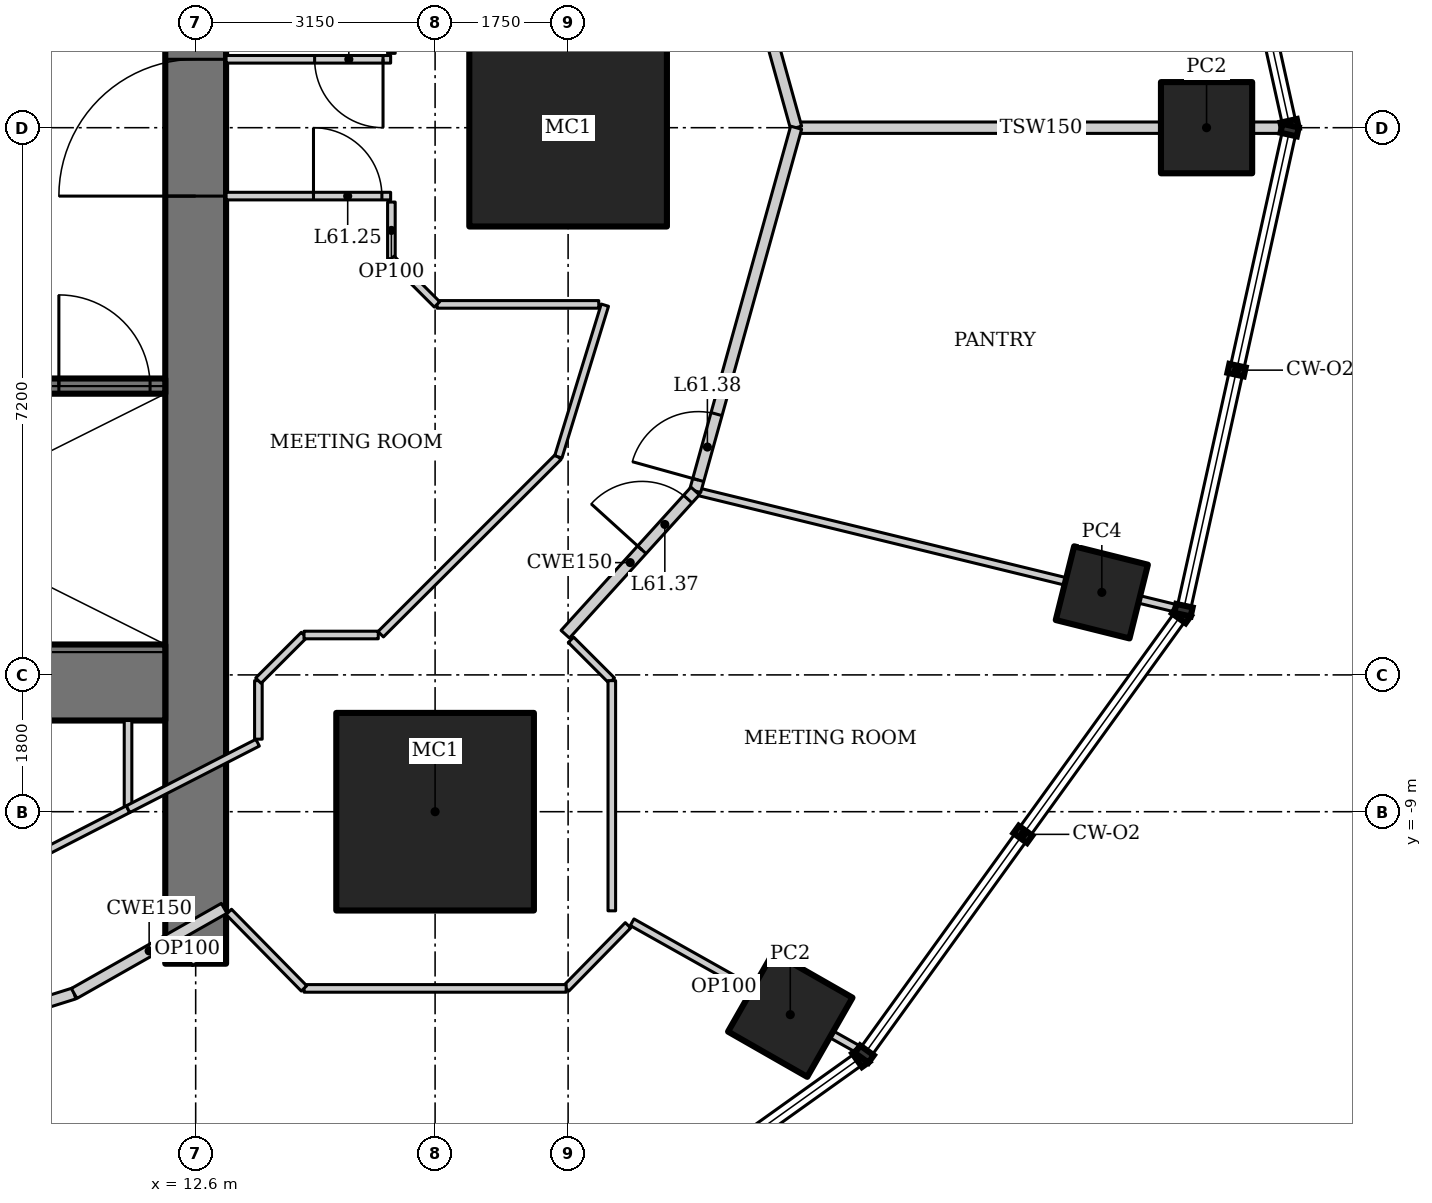
"""IFC4 building model, lengths in metres.
Left out: names, types, materials, properties, quantities, classifications, styles, units other than length and angle.
Written with IfcOpenShell. Run it as: python <this file> out.ifc"""

import sys

from ifc_helpers import new_model, si_unit, direction, frame, frame_2d, origin, origin_2d, place, context, subcontext, project, spatial, rectangle, hollow_rectangle, extrude, element, fill, save


model = new_model("IFC4")
c1 = context("Model", 3, precision=1e-05, world=origin(), true_north=direction((0.0, 1.0)))
c2 = subcontext(c1, "Body", "Model", "MODEL_VIEW")
j1 = project(units=[si_unit("LENGTHUNIT", "METRE"), si_unit("PLANEANGLEUNIT", "RADIAN")], contexts=[c1])
p1 = place(None, origin())
s1 = spatial("IfcSite", under=j1, at=p1, CompositionType="ELEMENT")
p2 = place(p1, origin())
s2 = spatial("IfcBuilding", under=s1, at=p2, CompositionType="ELEMENT")
p3 = place(p2, frame((0.0, 0.0, 262.0)))
s3 = spatial("IfcBuildingStorey", under=s2, at=p3, CompositionType="ELEMENT", Elevation=262.0)
for number, where, z_axis, x_axis in (
    (1, (17.5, 0.0, 0.0), (0.0, 0.0, 1.0), (1.0, 0.0, 0.0)),
    (2, (15.75, -9.0, 0.0), (0.0, 0.0, 1.0), (1.0, 0.0, 0.0)),
):
    element("IfcColumn", number, at=place(p3, frame(where, z_axis=z_axis, x_axis=x_axis)), inside=s3, PredefinedType="COLUMN", context=c2, shape_type="SweptSolid", body=[
        extrude(hollow_rectangle(XDim=2.6, YDim=2.6, WallThickness=0.13, at=origin_2d()), origin(), (0.0, 0.0, 1.0), 4.2),
    ])
for number, where, z_axis, x_axis in (
    (3, (25.9, 0.0, 0.0), (0.0, 0.0, 1.0), (1.0, 0.0, 0.0)),
    (4, (20.423, -11.67, 0.0), (0.0, 0.0, 1.0), (0.496, 0.868, 0.0)),
):
    element("IfcColumn", number, at=place(p3, frame(where, z_axis=z_axis, x_axis=x_axis)), inside=s3, PredefinedType="COLUMN", context=c2, shape_type="SweptSolid", body=[
        extrude(hollow_rectangle(XDim=1.2, YDim=1.2, WallThickness=0.1, at=origin_2d()), origin(), (0.0, 0.0, 1.0), 2.88),
    ])
p4 = place(p3, frame((24.522, -6.114, 0.0), z_axis=(0.0, 0.0, 1.0), x_axis=(0.2419218956, 0.970295726276, 0.0)))
e5 = element("IfcColumn", 5, at=p4, inside=s3, PredefinedType="COLUMN", context=c2, shape_type="SweptSolid", body=[
    extrude(hollow_rectangle(XDim=1.0, YDim=1.0, WallThickness=0.08, at=origin_2d()), origin(), (0.0, 0.0, 1.0), 3.1),
])
p5 = place(p3, frame((12.6, -11.0, 0.0), z_axis=(0.0, 0.0, 1.0), x_axis=(0.0, 1.0, 0.0)))
e6 = element("IfcWall", 6, at=p5, inside=s3, PredefinedType="SHEAR", context=c2, shape_type="SweptSolid", body=[
    extrude(rectangle(XDim=22.0, YDim=0.8, at=frame_2d((11.0, 0.0))), origin(), (0.0, 0.0, 1.0), 4.2),
])
p6 = place(p5, frame((10.1, 0.0, 0.0)))
e7 = element("IfcOpeningElement", 7, at=p6, cuts=e6, PredefinedType="OPENING", context=c2, shape_type="SweptSolid", body=[
    extrude(rectangle(XDim=1.8, YDim=2.1, at=frame_2d((0.9, 1.05))), frame((0.0, 0.41, 0.0), z_axis=(0.0, -1.0, 0.0), x_axis=(1.0, 0.0, 0.0)), (0.0, 0.0, 1.0), 0.82),
])
p7 = place(p3, frame((-12.2, -7.3, 0.0), z_axis=(0.0, 0.0, 1.0), x_axis=(1.0, 0.0, 0.0)))
e8 = element("IfcWall", 8, at=p7, inside=s3, PredefinedType="SHEAR", context=c2, shape_type="SweptSolid", body=[
    extrude(rectangle(XDim=24.4, YDim=1.0, at=frame_2d((12.2, 0.0))), origin(), (0.0, 0.0, 1.0), 4.2),
])
p8 = place(p3, frame((5.6, -3.4, 0.0), z_axis=(0.0, 0.0, 1.0), x_axis=(1.0, 0.0, 0.0)))
e9 = element("IfcWall", 9, at=p8, inside=s3, PredefinedType="SHEAR", context=c2, shape_type="SweptSolid", body=[
    extrude(rectangle(XDim=6.6, YDim=0.2, at=frame_2d((3.3, 0.0))), origin(), (0.0, 0.0, 1.0), 4.2),
])
p9 = place(p8, frame((5.2, 0.0, 0.0)))
e10 = element("IfcOpeningElement", 10, at=p9, cuts=e9, PredefinedType="OPENING", context=c2, shape_type="SweptSolid", body=[
    extrude(rectangle(XDim=1.2, YDim=2.1, at=frame_2d((0.6, 1.05))), frame((0.0, 0.11, 0.0), z_axis=(0.0, -1.0, 0.0), x_axis=(1.0, 0.0, 0.0)), (0.0, 0.0, 1.0), 0.22),
])
p10 = place(p3, frame((26.944, 0.0, 0.0), z_axis=(0.0, 0.0, 1.0), x_axis=(-1.0, 0.0, 0.0)))
e11 = element("IfcWall", 11, at=p10, inside=s3, PredefinedType="PARTITIONING", context=c2, shape_type="SweptSolid", body=[
    extrude(rectangle(XDim=6.444, YDim=0.15, at=frame_2d((3.222, 0.0))), origin(), (0.0, 0.0, 1.0), 3.349),
])
p11 = place(p3, frame((25.543, -6.335, 0.0), z_axis=(0.0, 0.0, 1.0), x_axis=(-0.971467850621, 0.237171278215, 0.0)))
e12 = element("IfcWall", 12, at=p11, inside=s3, PredefinedType="PARTITIONING", context=c2, shape_type="SweptSolid", body=[
    extrude(rectangle(XDim=6.558, YDim=0.1, at=frame_2d((3.279, 0.0))), origin(), (0.0, 0.0, 1.0), 3.108),
])
p12 = place(p3, frame((20.5, 0.0, 0.0), z_axis=(0.0, 0.0, 1.0), x_axis=(-0.26770731566, 0.963500281859, 0.0)))
e13 = element("IfcWall", 13, at=p12, inside=s3, PredefinedType="PARTITIONING", context=c2, shape_type="SweptSolid", body=[
    extrude(rectangle(XDim=4.961, YDim=0.15, at=frame_2d((2.48, 0.0))), origin(), (0.0, 0.0, 1.0), 4.05),
])
p13 = place(p3, frame((6.521, -12.799, 0.0), z_axis=(0.0, 0.0, 1.0), x_axis=(0.954031103669, 0.299707612903, 0.0)))
e14 = element("IfcWall", 14, at=p13, inside=s3, PredefinedType="PARTITIONING", context=c2, shape_type="SweptSolid", body=[
    extrude(rectangle(XDim=4.695, YDim=0.15, at=frame_2d((2.348, 0.0))), origin(), (0.0, 0.0, 1.0), 4.05),
])
p14 = place(p13, frame((1.231, 0.0, 0.0)))
e15 = element("IfcOpeningElement", 15, at=p14, cuts=e14, PredefinedType="OPENING", context=c2, shape_type="SweptSolid", body=[
    extrude(rectangle(XDim=1.8, YDim=2.1, at=frame_2d((0.9, 1.05))), frame((0.0, 0.085, 0.0), z_axis=(0.0, -1.0, 0.0), x_axis=(1.0, 0.0, 0.0)), (0.0, 0.0, 1.0), 0.17),
])
p15 = place(p3, frame((19.172, -4.78, 0.0), z_axis=(0.0, 0.0, 1.0), x_axis=(0.26770731566, 0.963500281859, 0.0)))
e16 = element("IfcWall", 16, at=p15, inside=s3, PredefinedType="PARTITIONING", context=c2, shape_type="SweptSolid", body=[
    extrude(rectangle(XDim=4.961, YDim=0.15, at=frame_2d((2.48, 0.0))), origin(), (0.0, 0.0, 1.0), 4.05),
])
p16 = place(p15, frame((0.15, 0.0, 0.0)))
e17 = element("IfcOpeningElement", 17, at=p16, cuts=e16, PredefinedType="OPENING", context=c2, shape_type="SweptSolid", body=[
    extrude(rectangle(XDim=0.9, YDim=2.1, at=frame_2d((0.45, 1.05))), frame((0.0, 0.085, 0.0), z_axis=(0.0, -1.0, 0.0), x_axis=(1.0, 0.0, 0.0)), (0.0, 0.0, 1.0), 0.17),
])
p17 = place(p3, frame((11.71, -7.8, 0.0), z_axis=(0.0, 0.0, 1.0), x_axis=(0.0, -1.0, 0.0)))
e18 = element("IfcWall", 18, at=p17, inside=s3, PredefinedType="PARTITIONING", context=c2, shape_type="SweptSolid", body=[
    extrude(rectangle(XDim=1.167, YDim=0.1, at=frame_2d((0.583, 0.0))), origin(), (0.0, 0.0, 1.0), 4.05),
])
p18 = place(p3, frame((11.71, -8.967, 0.0), z_axis=(0.0, 0.0, 1.0), x_axis=(-0.889605609385, -0.456729525814, 0.0)))
e19 = element("IfcWall", 19, at=p18, inside=s3, PredefinedType="PARTITIONING", context=c2, shape_type="SweptSolid", body=[
    extrude(rectangle(XDim=2.293, YDim=0.1, at=frame_2d((1.146, 0.0))), origin(), (0.0, 0.0, 1.0), 4.05),
])
p19 = place(p3, frame((12.6, -11.0, 0.0), z_axis=(0.0, 0.0, 1.0), x_axis=(-0.493794495037, 0.869578631678, 0.0)))
e20 = element("IfcWall", 20, at=p19, inside=s3, PredefinedType="PARTITIONING", context=c2, shape_type="SweptSolid", body=[
    extrude(rectangle(XDim=0.449, YDim=0.1, at=frame_2d((0.225, 0.0))), origin(), (0.0, 0.0, 1.0), 4.05),
])
p20 = place(p3, frame((21.358, -12.15, 0.0), z_axis=(0.0, 0.0, 1.0), x_axis=(-0.871730019583, 0.489986502832, 0.0)))
e21 = element("IfcWall", 21, at=p20, inside=s3, PredefinedType="PARTITIONING", context=c2, shape_type="SweptSolid", body=[
    extrude(rectangle(XDim=3.46, YDim=0.1, at=frame_2d((1.73, 0.0))), origin(), (0.0, 0.0, 1.0), 3.522),
])
p21 = place(p3, frame((11.001, -11.392, 0.0), z_axis=(0.0, 0.0, 1.0), x_axis=(0.869722107117, 0.493541747366, 0.0)))
e22 = element("IfcWall", 22, at=p21, inside=s3, PredefinedType="PARTITIONING", context=c2, shape_type="SweptSolid", body=[
    extrude(rectangle(XDim=2.27, YDim=0.15, at=frame_2d((1.135, 0.0))), origin(), (0.0, 0.0, 1.0), 4.05),
])
p22 = place(p3, frame((17.463, -6.665, 0.0), z_axis=(0.0, 0.0, 1.0), x_axis=(0.671721890643, 0.74080341632, 0.0)))
e23 = element("IfcWall", 23, at=p22, inside=s3, PredefinedType="PARTITIONING", context=c2, shape_type="SweptSolid", body=[
    extrude(rectangle(XDim=2.544, YDim=0.15, at=frame_2d((1.272, 0.0))), origin(), (0.0, 0.0, 1.0), 4.05),
])
p23 = place(p22, frame((1.5, 0.0, 0.0)))
e24 = element("IfcOpeningElement", 24, at=p23, cuts=e23, PredefinedType="OPENING", context=c2, shape_type="SweptSolid", body=[
    extrude(rectangle(XDim=0.9, YDim=2.1, at=frame_2d((0.45, 1.05))), frame((0.0, 0.085, 0.0), z_axis=(0.0, -1.0, 0.0), x_axis=(1.0, 0.0, 0.0)), (0.0, 0.0, 1.0), 0.17),
])
p24 = place(p3, frame((17.372, -4.331, 0.0), z_axis=(0.0, 0.0, 1.0), x_axis=(-0.707587114823, -0.70662612104, 0.0)))
e25 = element("IfcWall", 25, at=p24, inside=s3, PredefinedType="PARTITIONING", context=c2, shape_type="SweptSolid", body=[
    extrude(rectangle(XDim=3.303, YDim=0.1, at=frame_2d((1.651, 0.0))), origin(), (0.0, 0.0, 1.0), 4.05),
])
p25 = place(p3, frame((13.415, -8.092, 0.0), z_axis=(0.0, 0.0, 1.0), x_axis=(-0.889638356137, -0.456665736935, 0.0)))
e26 = element("IfcWall", 26, at=p25, inside=s3, PredefinedType="PARTITIONING", context=c2, shape_type="SweptSolid", body=[
    extrude(rectangle(XDim=1.917, YDim=0.1, at=frame_2d((0.958, 0.0))), origin(), (0.0, 0.0, 1.0), 4.05),
])
p26 = place(p3, frame((13.425, -8.046, 0.0), z_axis=(0.0, 0.0, 1.0), x_axis=(0.0, 1.0, 0.0)))
e27 = element("IfcWall", 27, at=p26, inside=s3, PredefinedType="PARTITIONING", context=c2, shape_type="SweptSolid", body=[
    extrude(rectangle(XDim=0.77, YDim=0.1, at=frame_2d((0.385, 0.0))), origin(), (0.0, 0.0, 1.0), 4.05),
])
p27 = place(p3, frame((13.425, -7.275, 0.0), z_axis=(0.0, 0.0, 1.0), x_axis=(0.707106781187, 0.707106781187, 0.0)))
e28 = element("IfcWall", 28, at=p27, inside=s3, PredefinedType="PARTITIONING", context=c2, shape_type="SweptSolid", body=[
    extrude(rectangle(XDim=0.849, YDim=0.1, at=frame_2d((0.425, 0.0))), origin(), (0.0, 0.0, 1.0), 4.05),
])
p28 = place(p3, frame((14.025, -6.675, 0.0), z_axis=(0.0, 0.0, 1.0), x_axis=(1.0, 0.0, 0.0)))
e29 = element("IfcWall", 29, at=p28, inside=s3, PredefinedType="PARTITIONING", context=c2, shape_type="SweptSolid", body=[
    extrude(rectangle(XDim=0.977, YDim=0.1, at=frame_2d((0.488, 0.0))), origin(), (0.0, 0.0, 1.0), 4.05),
])
p29 = place(p3, frame((18.288, -10.495, 0.0), z_axis=(0.0, 0.0, 1.0), x_axis=(-0.699823580681, -0.714315725659, 0.0)))
e30 = element("IfcWall", 30, at=p29, inside=s3, PredefinedType="PARTITIONING", context=c2, shape_type="SweptSolid", body=[
    extrude(rectangle(XDim=1.162, YDim=0.1, at=frame_2d((0.581, 0.0))), origin(), (0.0, 0.0, 1.0), 4.05),
])
p30 = place(p3, frame((17.475, -11.325, 0.0), z_axis=(0.0, 0.0, 1.0), x_axis=(-1.0, 0.0, 0.0)))
e31 = element("IfcWall", 31, at=p30, inside=s3, PredefinedType="PARTITIONING", context=c2, shape_type="SweptSolid", body=[
    extrude(rectangle(XDim=3.449, YDim=0.1, at=frame_2d((1.725, 0.0))), origin(), (0.0, 0.0, 1.0), 4.05),
])
p31 = place(p3, frame((14.025, -11.325, 0.0), z_axis=(0.0, 0.0, 1.0), x_axis=(-0.701113567316, 0.713049623606, 0.0)))
e32 = element("IfcWall", 32, at=p31, inside=s3, PredefinedType="PARTITIONING", context=c2, shape_type="SweptSolid", body=[
    extrude(rectangle(XDim=1.411, YDim=0.1, at=frame_2d((0.706, 0.0))), origin(), (0.0, 0.0, 1.0), 4.05),
])
p32 = place(p3, frame((17.538, -6.738, 0.0), z_axis=(0.0, 0.0, 1.0), x_axis=(0.707106781187, -0.707106781187, 0.0)))
e33 = element("IfcWall", 33, at=p32, inside=s3, PredefinedType="PARTITIONING", context=c2, shape_type="SweptSolid", body=[
    extrude(rectangle(XDim=0.76, YDim=0.1, at=frame_2d((0.38, 0.0))), origin(), (0.0, 0.0, 1.0), 4.05),
])
p33 = place(p3, frame((18.075, -7.275, 0.0), z_axis=(0.0, 0.0, 1.0), x_axis=(0.0, -1.0, 0.0)))
e34 = element("IfcWall", 34, at=p33, inside=s3, PredefinedType="PARTITIONING", context=c2, shape_type="SweptSolid", body=[
    extrude(rectangle(XDim=3.029, YDim=0.1, at=frame_2d((1.514, 0.0))), origin(), (0.0, 0.0, 1.0), 3.6),
])
p34 = place(p3, frame((13.0, -0.9, 0.0), z_axis=(0.0, 0.0, 1.0), x_axis=(1.0, 0.0, 0.0)))
e35 = element("IfcWall", 35, at=p34, inside=s3, PredefinedType="PARTITIONING", context=c2, shape_type="SweptSolid", body=[
    extrude(rectangle(XDim=2.165, YDim=0.1, at=frame_2d((1.083, 0.0))), origin(), (0.0, 0.0, 1.0), 4.05),
])
p35 = place(p34, frame((1.15, 0.0, 0.0)))
e36 = element("IfcOpeningElement", 36, at=p35, cuts=e35, PredefinedType="OPENING", context=c2, shape_type="SweptSolid", body=[
    extrude(rectangle(XDim=0.9, YDim=2.1, at=frame_2d((0.45, 1.05))), frame((0.0, 0.06, 0.0), z_axis=(0.0, -1.0, 0.0), x_axis=(1.0, 0.0, 0.0)), (0.0, 0.0, 1.0), 0.12),
])
p36 = place(p3, frame((17.984, -2.335, 0.0), z_axis=(0.0, 0.0, 1.0), x_axis=(-0.293231279211, -0.956041535129, 0.0)))
e37 = element("IfcWall", 37, at=p36, inside=s3, PredefinedType="PARTITIONING", context=c2, shape_type="SweptSolid", body=[
    extrude(rectangle(XDim=2.088, YDim=0.1, at=frame_2d((1.044, 0.0))), origin(), (0.0, 0.0, 1.0), 4.05),
])
p37 = place(p3, frame((15.165, 0.9, 0.0), z_axis=(0.0, 0.0, 1.0), x_axis=(-1.0, 0.0, 0.0)))
e38 = element("IfcWall", 38, at=p37, inside=s3, PredefinedType="PARTITIONING", context=c2, shape_type="SweptSolid", body=[
    extrude(rectangle(XDim=2.165, YDim=0.1, at=frame_2d((1.083, 0.0))), origin(), (0.0, 0.0, 1.0), 4.05),
])
p38 = place(p37, frame((0.1, 0.0, 0.0)))
e39 = element("IfcOpeningElement", 39, at=p38, cuts=e38, PredefinedType="OPENING", context=c2, shape_type="SweptSolid", body=[
    extrude(rectangle(XDim=0.9, YDim=2.1, at=frame_2d((0.45, 1.05))), frame((0.0, 0.06, 0.0), z_axis=(0.0, -1.0, 0.0), x_axis=(1.0, 0.0, 0.0)), (0.0, 0.0, 1.0), 0.12),
])
p39 = place(p3, frame((15.175, -1.725, 0.0), z_axis=(0.0, 0.0, 1.0), x_axis=(0.0, 1.0, 0.0)))
e40 = element("IfcWall", 40, at=p39, inside=s3, PredefinedType="PARTITIONING", context=c2, shape_type="SweptSolid", body=[
    extrude(rectangle(XDim=0.746, YDim=0.1, at=frame_2d((0.373, 0.0))), origin(), (0.0, 0.0, 1.0), 4.05),
])
p40 = place(p3, frame((17.903, -2.325, 0.0), z_axis=(0.0, 0.0, 1.0), x_axis=(-1.0, 0.0, 0.0)))
e41 = element("IfcWall", 41, at=p40, inside=s3, PredefinedType="PARTITIONING", context=c2, shape_type="SweptSolid", body=[
    extrude(rectangle(XDim=2.128, YDim=0.1, at=frame_2d((1.064, 0.0))), origin(), (0.0, 0.0, 1.0), 4.05),
])
p41 = place(p3, frame((15.775, -2.325, 0.0), z_axis=(0.0, 0.0, 1.0), x_axis=(-0.707106781187, 0.707106781187, 0.0)))
e42 = element("IfcWall", 42, at=p41, inside=s3, PredefinedType="PARTITIONING", context=c2, shape_type="SweptSolid", body=[
    extrude(rectangle(XDim=0.849, YDim=0.1, at=frame_2d((0.425, 0.0))), origin(), (0.0, 0.0, 1.0), 4.05),
])
p42 = place(p3, frame((15.175, 0.978, 0.0), z_axis=(0.0, 0.0, 1.0), x_axis=(0.0, 1.0, 0.0)))
e43 = element("IfcWall", 43, at=p42, inside=s3, PredefinedType="PARTITIONING", context=c2, shape_type="SweptSolid", body=[
    extrude(rectangle(XDim=0.746, YDim=0.1, at=frame_2d((0.373, 0.0))), origin(), (0.0, 0.0, 1.0), 4.05),
])
p43 = place(p9, origin())
e44 = element("IfcDoor", 44, at=p43, inside=s3, OperationType="SINGLE_SWING_RIGHT", PredefinedType="DOOR", context=c2, shape_type="SweptSolid", body=[
    extrude(rectangle(XDim=1.2, YDim=2.1, at=frame_2d((0.6, 1.05))), frame((0.0, 0.025, 0.0), z_axis=(0.0, -1.0, 0.0), x_axis=(1.0, 0.0, 0.0)), (0.0, 0.0, 1.0), 0.05),
])
fill(e10, e44)
p44 = place(p6, origin())
e45 = element("IfcDoor", 45, at=p44, inside=s3, OperationType="DOUBLE_DOOR_DOUBLE_SWING", PredefinedType="DOOR", context=c2, shape_type="SweptSolid", body=[
    extrude(rectangle(XDim=1.8, YDim=2.1, at=frame_2d((0.9, 1.05))), frame((0.0, 0.025, 0.0), z_axis=(0.0, -1.0, 0.0), x_axis=(1.0, 0.0, 0.0)), (0.0, 0.0, 1.0), 0.05),
])
fill(e7, e45)
p45 = place(p35, origin())
e46 = element("IfcDoor", 46, at=p45, inside=s3, OperationType="SINGLE_SWING_LEFT", PredefinedType="DOOR", context=c2, shape_type="SweptSolid", body=[
    extrude(rectangle(XDim=0.9, YDim=2.1, at=frame_2d((0.45, 1.05))), frame((0.0, 0.025, 0.0), z_axis=(0.0, -1.0, 0.0), x_axis=(1.0, 0.0, 0.0)), (0.0, 0.0, 1.0), 0.05),
])
fill(e36, e46)
p46 = place(p38, origin())
e47 = element("IfcDoor", 47, at=p46, inside=s3, OperationType="SINGLE_SWING_LEFT", PredefinedType="DOOR", context=c2, shape_type="SweptSolid", body=[
    extrude(rectangle(XDim=0.9, YDim=2.1, at=frame_2d((0.45, 1.05))), frame((0.0, 0.025, 0.0), z_axis=(0.0, -1.0, 0.0), x_axis=(1.0, 0.0, 0.0)), (0.0, 0.0, 1.0), 0.05),
])
fill(e39, e47)
p47 = place(p23, origin())
e48 = element("IfcDoor", 48, at=p47, inside=s3, OperationType="SINGLE_SWING_LEFT", PredefinedType="DOOR", context=c2, shape_type="SweptSolid", body=[
    extrude(rectangle(XDim=0.9, YDim=2.1, at=frame_2d((0.45, 1.05))), frame((0.0, 0.025, 0.0), z_axis=(0.0, -1.0, 0.0), x_axis=(1.0, 0.0, 0.0)), (0.0, 0.0, 1.0), 0.05),
])
fill(e24, e48)
p48 = place(p16, origin())
e49 = element("IfcDoor", 49, at=p48, inside=s3, OperationType="SINGLE_SWING_LEFT", PredefinedType="DOOR", context=c2, shape_type="SweptSolid", body=[
    extrude(rectangle(XDim=0.9, YDim=2.1, at=frame_2d((0.45, 1.05))), frame((0.0, 0.025, 0.0), z_axis=(0.0, -1.0, 0.0), x_axis=(1.0, 0.0, 0.0)), (0.0, 0.0, 1.0), 0.05),
])
fill(e17, e49)
save(model, sys.argv[1])
